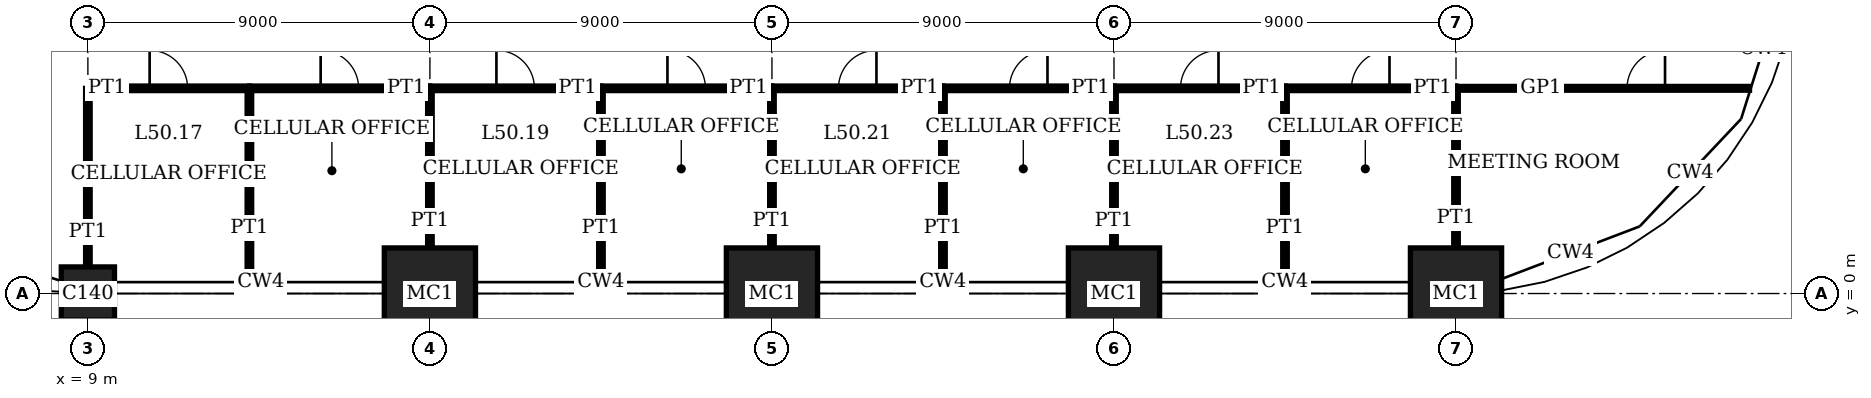
"""IFC4 building model, lengths in metres.
Left out: names, types, materials, properties, quantities, classifications, styles, units other than length and angle.
Written with IfcOpenShell. Run it as: python <this file> out.ifc"""

import sys

from ifc_helpers import new_model, si_unit, direction, frame, frame_2d, origin, origin_2d, place, context, subcontext, project, spatial, rectangle, extrude, element, fill, save


model = new_model("IFC4")
c1 = context("Model", 3, precision=1e-05, world=origin(), true_north=direction((0.0, 1.0)))
c2 = subcontext(c1, "Body", "Model", "MODEL_VIEW")
j1 = project(units=[si_unit("LENGTHUNIT", "METRE"), si_unit("PLANEANGLEUNIT", "RADIAN")], contexts=[c1])
p1 = place(None, origin())
s1 = spatial("IfcSite", under=j1, at=p1, CompositionType="ELEMENT")
p2 = place(p1, origin())
s2 = spatial("IfcBuilding", under=s1, at=p2, CompositionType="ELEMENT")
p3 = place(p2, frame((0.0, 0.0, 206.2)))
s3 = spatial("IfcBuildingStorey", under=s2, at=p3, CompositionType="ELEMENT", Elevation=206.2)
p4 = place(p3, frame((9.0, 0.0, 0.0), z_axis=(0.0, 0.0, 1.0), x_axis=(1.0, 0.0, 0.0)))
e1 = element("IfcColumn", 1, at=p4, inside=s3, PredefinedType="COLUMN", context=c2, shape_type="SweptSolid", body=[
    extrude(rectangle(XDim=1.4, YDim=1.4, at=origin_2d()), origin(), (0.0, 0.0, 1.0), 4.0),
])
for number, where, z_axis, x_axis in (
    (2, (18.0, 0.0, 0.0), (0.0, 0.0, 1.0), (1.0, 0.0, 0.0)),
    (3, (27.0, 0.0, 0.0), (0.0, 0.0, 1.0), (1.0, 0.0, 0.0)),
    (4, (36.0, 0.0, 0.0), (0.0, 0.0, 1.0), (1.0, 0.0, 0.0)),
    (5, (45.0, 0.0, 0.0), (0.0, 0.0, 1.0), (1.0, 0.0, 0.0)),
):
    element("IfcColumn", number, at=place(p3, frame(where, z_axis=z_axis, x_axis=x_axis)), inside=s3, PredefinedType="COLUMN", context=c2, shape_type="SweptSolid", body=[
        extrude(rectangle(XDim=2.4, YDim=2.4, at=origin_2d()), origin(), (0.0, 0.0, 1.0), 4.0),
    ])
p5 = place(p3, frame((9.0, 5.4, 0.0), z_axis=(0.0, 0.0, 1.0), x_axis=(1.0, 0.0, 0.0)))
e6 = element("IfcWall", 6, at=p5, inside=s3, PredefinedType="PARTITIONING", context=c2, shape_type="SweptSolid", body=[
    extrude(rectangle(XDim=4.25, YDim=0.12, at=frame_2d((2.125, 0.0))), origin(), (0.0, 0.0, 1.0), 3.75),
])
p6 = place(p5, frame((1.625, 0.0, 0.0)))
e7 = element("IfcOpeningElement", 7, at=p6, cuts=e6, PredefinedType="OPENING", context=c2, shape_type="SweptSolid", body=[
    extrude(rectangle(XDim=1.0, YDim=2.4, at=frame_2d((0.5, 1.2))), frame((0.0, 0.07, 0.0), z_axis=(0.0, -1.0, 0.0), x_axis=(1.0, 0.0, 0.0)), (0.0, 0.0, 1.0), 0.14),
])
p7 = place(p3, frame((13.25, 5.4, 0.0), z_axis=(0.0, 0.0, 1.0), x_axis=(1.0, 0.0, 0.0)))
e8 = element("IfcWall", 8, at=p7, inside=s3, PredefinedType="PARTITIONING", context=c2, shape_type="SweptSolid", body=[
    extrude(rectangle(XDim=4.75, YDim=0.12, at=frame_2d((2.375, 0.0))), origin(), (0.0, 0.0, 1.0), 3.75),
])
p8 = place(p7, frame((1.875, 0.0, 0.0)))
e9 = element("IfcOpeningElement", 9, at=p8, cuts=e8, PredefinedType="OPENING", context=c2, shape_type="SweptSolid", body=[
    extrude(rectangle(XDim=1.0, YDim=2.4, at=frame_2d((0.5, 1.2))), frame((0.0, 0.07, 0.0), z_axis=(0.0, -1.0, 0.0), x_axis=(1.0, 0.0, 0.0)), (0.0, 0.0, 1.0), 0.14),
])
p9 = place(p3, frame((18.0, 5.4, 0.0), z_axis=(0.0, 0.0, 1.0), x_axis=(1.0, 0.0, 0.0)))
e10 = element("IfcWall", 10, at=p9, inside=s3, PredefinedType="PARTITIONING", context=c2, shape_type="SweptSolid", body=[
    extrude(rectangle(XDim=4.5, YDim=0.12, at=frame_2d((2.25, 0.0))), origin(), (0.0, 0.0, 1.0), 3.75),
])
p10 = place(p9, frame((1.75, 0.0, 0.0)))
e11 = element("IfcOpeningElement", 11, at=p10, cuts=e10, PredefinedType="OPENING", context=c2, shape_type="SweptSolid", body=[
    extrude(rectangle(XDim=1.0, YDim=2.4, at=frame_2d((0.5, 1.2))), frame((0.0, 0.07, 0.0), z_axis=(0.0, -1.0, 0.0), x_axis=(1.0, 0.0, 0.0)), (0.0, 0.0, 1.0), 0.14),
])
p11 = place(p3, frame((22.5, 5.4, 0.0), z_axis=(0.0, 0.0, 1.0), x_axis=(1.0, 0.0, 0.0)))
e12 = element("IfcWall", 12, at=p11, inside=s3, PredefinedType="PARTITIONING", context=c2, shape_type="SweptSolid", body=[
    extrude(rectangle(XDim=4.5, YDim=0.12, at=frame_2d((2.25, 0.0))), origin(), (0.0, 0.0, 1.0), 3.75),
])
p12 = place(p11, frame((1.75, 0.0, 0.0)))
e13 = element("IfcOpeningElement", 13, at=p12, cuts=e12, PredefinedType="OPENING", context=c2, shape_type="SweptSolid", body=[
    extrude(rectangle(XDim=1.0, YDim=2.4, at=frame_2d((0.5, 1.2))), frame((0.0, 0.07, 0.0), z_axis=(0.0, -1.0, 0.0), x_axis=(1.0, 0.0, 0.0)), (0.0, 0.0, 1.0), 0.14),
])
p13 = place(p3, frame((27.0, 5.4, 0.0), z_axis=(0.0, 0.0, 1.0), x_axis=(1.0, 0.0, 0.0)))
e14 = element("IfcWall", 14, at=p13, inside=s3, PredefinedType="PARTITIONING", context=c2, shape_type="SweptSolid", body=[
    extrude(rectangle(XDim=4.5, YDim=0.12, at=frame_2d((2.25, 0.0))), origin(), (0.0, 0.0, 1.0), 3.75),
])
p14 = place(p13, frame((1.75, 0.0, 0.0)))
e15 = element("IfcOpeningElement", 15, at=p14, cuts=e14, PredefinedType="OPENING", context=c2, shape_type="SweptSolid", body=[
    extrude(rectangle(XDim=1.0, YDim=2.4, at=frame_2d((0.5, 1.2))), frame((0.0, 0.07, 0.0), z_axis=(0.0, -1.0, 0.0), x_axis=(1.0, 0.0, 0.0)), (0.0, 0.0, 1.0), 0.14),
])
p15 = place(p3, frame((31.5, 5.4, 0.0), z_axis=(0.0, 0.0, 1.0), x_axis=(1.0, 0.0, 0.0)))
e16 = element("IfcWall", 16, at=p15, inside=s3, PredefinedType="PARTITIONING", context=c2, shape_type="SweptSolid", body=[
    extrude(rectangle(XDim=4.5, YDim=0.12, at=frame_2d((2.25, 0.0))), origin(), (0.0, 0.0, 1.0), 3.75),
])
p16 = place(p15, frame((1.75, 0.0, 0.0)))
e17 = element("IfcOpeningElement", 17, at=p16, cuts=e16, PredefinedType="OPENING", context=c2, shape_type="SweptSolid", body=[
    extrude(rectangle(XDim=1.0, YDim=2.4, at=frame_2d((0.5, 1.2))), frame((0.0, 0.07, 0.0), z_axis=(0.0, -1.0, 0.0), x_axis=(1.0, 0.0, 0.0)), (0.0, 0.0, 1.0), 0.14),
])
p17 = place(p3, frame((36.0, 5.4, 0.0), z_axis=(0.0, 0.0, 1.0), x_axis=(1.0, 0.0, 0.0)))
e18 = element("IfcWall", 18, at=p17, inside=s3, PredefinedType="PARTITIONING", context=c2, shape_type="SweptSolid", body=[
    extrude(rectangle(XDim=4.5, YDim=0.12, at=frame_2d((2.25, 0.0))), origin(), (0.0, 0.0, 1.0), 3.75),
])
p18 = place(p17, frame((1.75, 0.0, 0.0)))
e19 = element("IfcOpeningElement", 19, at=p18, cuts=e18, PredefinedType="OPENING", context=c2, shape_type="SweptSolid", body=[
    extrude(rectangle(XDim=1.0, YDim=2.4, at=frame_2d((0.5, 1.2))), frame((0.0, 0.07, 0.0), z_axis=(0.0, -1.0, 0.0), x_axis=(1.0, 0.0, 0.0)), (0.0, 0.0, 1.0), 0.14),
])
p19 = place(p3, frame((40.5, 5.4, 0.0), z_axis=(0.0, 0.0, 1.0), x_axis=(1.0, 0.0, 0.0)))
e20 = element("IfcWall", 20, at=p19, inside=s3, PredefinedType="PARTITIONING", context=c2, shape_type="SweptSolid", body=[
    extrude(rectangle(XDim=4.5, YDim=0.12, at=frame_2d((2.25, 0.0))), origin(), (0.0, 0.0, 1.0), 3.75),
])
p20 = place(p19, frame((1.75, 0.0, 0.0)))
e21 = element("IfcOpeningElement", 21, at=p20, cuts=e20, PredefinedType="OPENING", context=c2, shape_type="SweptSolid", body=[
    extrude(rectangle(XDim=1.0, YDim=2.4, at=frame_2d((0.5, 1.2))), frame((0.0, 0.07, 0.0), z_axis=(0.0, -1.0, 0.0), x_axis=(1.0, 0.0, 0.0)), (0.0, 0.0, 1.0), 0.14),
])
p21 = place(p3, frame((45.0, 5.4, 0.0), z_axis=(0.0, 0.0, 1.0), x_axis=(1.0, 0.0, 0.0)))
e22 = element("IfcWall", 22, at=p21, inside=s3, PredefinedType="PARTITIONING", context=c2, shape_type="SweptSolid", body=[
    extrude(rectangle(XDim=7.723, YDim=0.1, at=frame_2d((3.862, 0.0))), origin(), (0.0, 0.0, 1.0), 3.75),
])
p22 = place(p21, frame((4.5, 0.0, 0.0)))
e23 = element("IfcOpeningElement", 23, at=p22, cuts=e22, PredefinedType="OPENING", context=c2, shape_type="SweptSolid", body=[
    extrude(rectangle(XDim=1.0, YDim=2.4, at=frame_2d((0.5, 1.2))), frame((0.0, 0.06, 0.0), z_axis=(0.0, -1.0, 0.0), x_axis=(1.0, 0.0, 0.0)), (0.0, 0.0, 1.0), 0.12),
])
p23 = place(p3, frame((9.0, 0.7, 0.0), z_axis=(0.0, 0.0, 1.0), x_axis=(0.0, 1.0, 0.0)))
e24 = element("IfcWall", 24, at=p23, inside=s3, PredefinedType="PARTITIONING", context=c2, shape_type="SweptSolid", body=[
    extrude(rectangle(XDim=4.7, YDim=0.12, at=frame_2d((2.35, 0.0))), origin(), (0.0, 0.0, 1.0), 3.05),
])
p24 = place(p3, frame((13.25, 0.31, 0.0), z_axis=(0.0, 0.0, 1.0), x_axis=(0.0, 1.0, 0.0)))
e25 = element("IfcWall", 25, at=p24, inside=s3, PredefinedType="PARTITIONING", context=c2, shape_type="SweptSolid", body=[
    extrude(rectangle(XDim=5.09, YDim=0.12, at=frame_2d((2.545, 0.0))), origin(), (0.0, 0.0, 1.0), 3.75),
])
p25 = place(p3, frame((18.0, 1.2, 0.0), z_axis=(0.0, 0.0, 1.0), x_axis=(0.0, 1.0, 0.0)))
e26 = element("IfcWall", 26, at=p25, inside=s3, PredefinedType="PARTITIONING", context=c2, shape_type="SweptSolid", body=[
    extrude(rectangle(XDim=4.2, YDim=0.12, at=frame_2d((2.1, 0.0))), origin(), (0.0, 0.0, 1.0), 3.05),
])
p26 = place(p3, frame((22.5, 0.31, 0.0), z_axis=(0.0, 0.0, 1.0), x_axis=(0.0, 1.0, 0.0)))
e27 = element("IfcWall", 27, at=p26, inside=s3, PredefinedType="PARTITIONING", context=c2, shape_type="SweptSolid", body=[
    extrude(rectangle(XDim=5.09, YDim=0.12, at=frame_2d((2.545, 0.0))), origin(), (0.0, 0.0, 1.0), 3.75),
])
p27 = place(p3, frame((27.0, 1.2, 0.0), z_axis=(0.0, 0.0, 1.0), x_axis=(0.0, 1.0, 0.0)))
e28 = element("IfcWall", 28, at=p27, inside=s3, PredefinedType="PARTITIONING", context=c2, shape_type="SweptSolid", body=[
    extrude(rectangle(XDim=4.2, YDim=0.12, at=frame_2d((2.1, 0.0))), origin(), (0.0, 0.0, 1.0), 3.05),
])
p28 = place(p3, frame((31.5, 0.31, 0.0), z_axis=(0.0, 0.0, 1.0), x_axis=(0.0, 1.0, 0.0)))
e29 = element("IfcWall", 29, at=p28, inside=s3, PredefinedType="PARTITIONING", context=c2, shape_type="SweptSolid", body=[
    extrude(rectangle(XDim=5.09, YDim=0.12, at=frame_2d((2.545, 0.0))), origin(), (0.0, 0.0, 1.0), 3.75),
])
p29 = place(p3, frame((36.0, 1.2, 0.0), z_axis=(0.0, 0.0, 1.0), x_axis=(0.0, 1.0, 0.0)))
e30 = element("IfcWall", 30, at=p29, inside=s3, PredefinedType="PARTITIONING", context=c2, shape_type="SweptSolid", body=[
    extrude(rectangle(XDim=4.2, YDim=0.12, at=frame_2d((2.1, 0.0))), origin(), (0.0, 0.0, 1.0), 3.05),
])
p30 = place(p3, frame((40.5, 0.31, 0.0), z_axis=(0.0, 0.0, 1.0), x_axis=(0.0, 1.0, 0.0)))
e31 = element("IfcWall", 31, at=p30, inside=s3, PredefinedType="PARTITIONING", context=c2, shape_type="SweptSolid", body=[
    extrude(rectangle(XDim=5.09, YDim=0.12, at=frame_2d((2.545, 0.0))), origin(), (0.0, 0.0, 1.0), 3.75),
])
p31 = place(p3, frame((45.0, 1.2, 0.0), z_axis=(0.0, 0.0, 1.0), x_axis=(0.0, 1.0, 0.0)))
e32 = element("IfcWall", 32, at=p31, inside=s3, PredefinedType="PARTITIONING", context=c2, shape_type="SweptSolid", body=[
    extrude(rectangle(XDim=4.2, YDim=0.12, at=frame_2d((2.1, 0.0))), origin(), (0.0, 0.0, 1.0), 3.05),
])
p32 = place(p6, origin())
e33 = element("IfcDoor", 33, at=p32, inside=s3, OperationType="SINGLE_SWING_RIGHT", PredefinedType="DOOR", context=c2, shape_type="SweptSolid", body=[
    extrude(rectangle(XDim=1.0, YDim=2.4, at=frame_2d((0.5, 1.2))), frame((0.0, 0.025, 0.0), z_axis=(0.0, -1.0, 0.0), x_axis=(1.0, 0.0, 0.0)), (0.0, 0.0, 1.0), 0.05),
])
fill(e7, e33)
p33 = place(p8, origin())
e34 = element("IfcDoor", 34, at=p33, inside=s3, OperationType="SINGLE_SWING_RIGHT", PredefinedType="DOOR", context=c2, shape_type="SweptSolid", body=[
    extrude(rectangle(XDim=1.0, YDim=2.4, at=frame_2d((0.5, 1.2))), frame((0.0, 0.025, 0.0), z_axis=(0.0, -1.0, 0.0), x_axis=(1.0, 0.0, 0.0)), (0.0, 0.0, 1.0), 0.05),
])
fill(e9, e34)
p34 = place(p10, origin())
e35 = element("IfcDoor", 35, at=p34, inside=s3, OperationType="SINGLE_SWING_RIGHT", PredefinedType="DOOR", context=c2, shape_type="SweptSolid", body=[
    extrude(rectangle(XDim=1.0, YDim=2.4, at=frame_2d((0.5, 1.2))), frame((0.0, 0.025, 0.0), z_axis=(0.0, -1.0, 0.0), x_axis=(1.0, 0.0, 0.0)), (0.0, 0.0, 1.0), 0.05),
])
fill(e11, e35)
p35 = place(p12, origin())
e36 = element("IfcDoor", 36, at=p35, inside=s3, OperationType="SINGLE_SWING_RIGHT", PredefinedType="DOOR", context=c2, shape_type="SweptSolid", body=[
    extrude(rectangle(XDim=1.0, YDim=2.4, at=frame_2d((0.5, 1.2))), frame((0.0, 0.025, 0.0), z_axis=(0.0, -1.0, 0.0), x_axis=(1.0, 0.0, 0.0)), (0.0, 0.0, 1.0), 0.05),
])
fill(e13, e36)
p36 = place(p14, origin())
e37 = element("IfcDoor", 37, at=p36, inside=s3, OperationType="SINGLE_SWING_LEFT", PredefinedType="DOOR", context=c2, shape_type="SweptSolid", body=[
    extrude(rectangle(XDim=1.0, YDim=2.4, at=frame_2d((0.5, 1.2))), frame((0.0, 0.025, 0.0), z_axis=(0.0, -1.0, 0.0), x_axis=(1.0, 0.0, 0.0)), (0.0, 0.0, 1.0), 0.05),
])
fill(e15, e37)
p37 = place(p16, origin())
e38 = element("IfcDoor", 38, at=p37, inside=s3, OperationType="SINGLE_SWING_LEFT", PredefinedType="DOOR", context=c2, shape_type="SweptSolid", body=[
    extrude(rectangle(XDim=1.0, YDim=2.4, at=frame_2d((0.5, 1.2))), frame((0.0, 0.025, 0.0), z_axis=(0.0, -1.0, 0.0), x_axis=(1.0, 0.0, 0.0)), (0.0, 0.0, 1.0), 0.05),
])
fill(e17, e38)
p38 = place(p18, origin())
e39 = element("IfcDoor", 39, at=p38, inside=s3, OperationType="SINGLE_SWING_LEFT", PredefinedType="DOOR", context=c2, shape_type="SweptSolid", body=[
    extrude(rectangle(XDim=1.0, YDim=2.4, at=frame_2d((0.5, 1.2))), frame((0.0, 0.025, 0.0), z_axis=(0.0, -1.0, 0.0), x_axis=(1.0, 0.0, 0.0)), (0.0, 0.0, 1.0), 0.05),
])
fill(e19, e39)
p39 = place(p20, origin())
e40 = element("IfcDoor", 40, at=p39, inside=s3, OperationType="SINGLE_SWING_LEFT", PredefinedType="DOOR", context=c2, shape_type="SweptSolid", body=[
    extrude(rectangle(XDim=1.0, YDim=2.4, at=frame_2d((0.5, 1.2))), frame((0.0, 0.025, 0.0), z_axis=(0.0, -1.0, 0.0), x_axis=(1.0, 0.0, 0.0)), (0.0, 0.0, 1.0), 0.05),
])
fill(e21, e40)
p40 = place(p22, origin())
e41 = element("IfcDoor", 41, at=p40, inside=s3, OperationType="SINGLE_SWING_LEFT", PredefinedType="DOOR", context=c2, shape_type="SweptSolid", body=[
    extrude(rectangle(XDim=1.0, YDim=2.4, at=frame_2d((0.5, 1.2))), frame((0.0, 0.02, 0.0), z_axis=(0.0, -1.0, 0.0), x_axis=(1.0, 0.0, 0.0)), (0.0, 0.0, 1.0), 0.04),
])
fill(e23, e41)
save(model, sys.argv[1])
